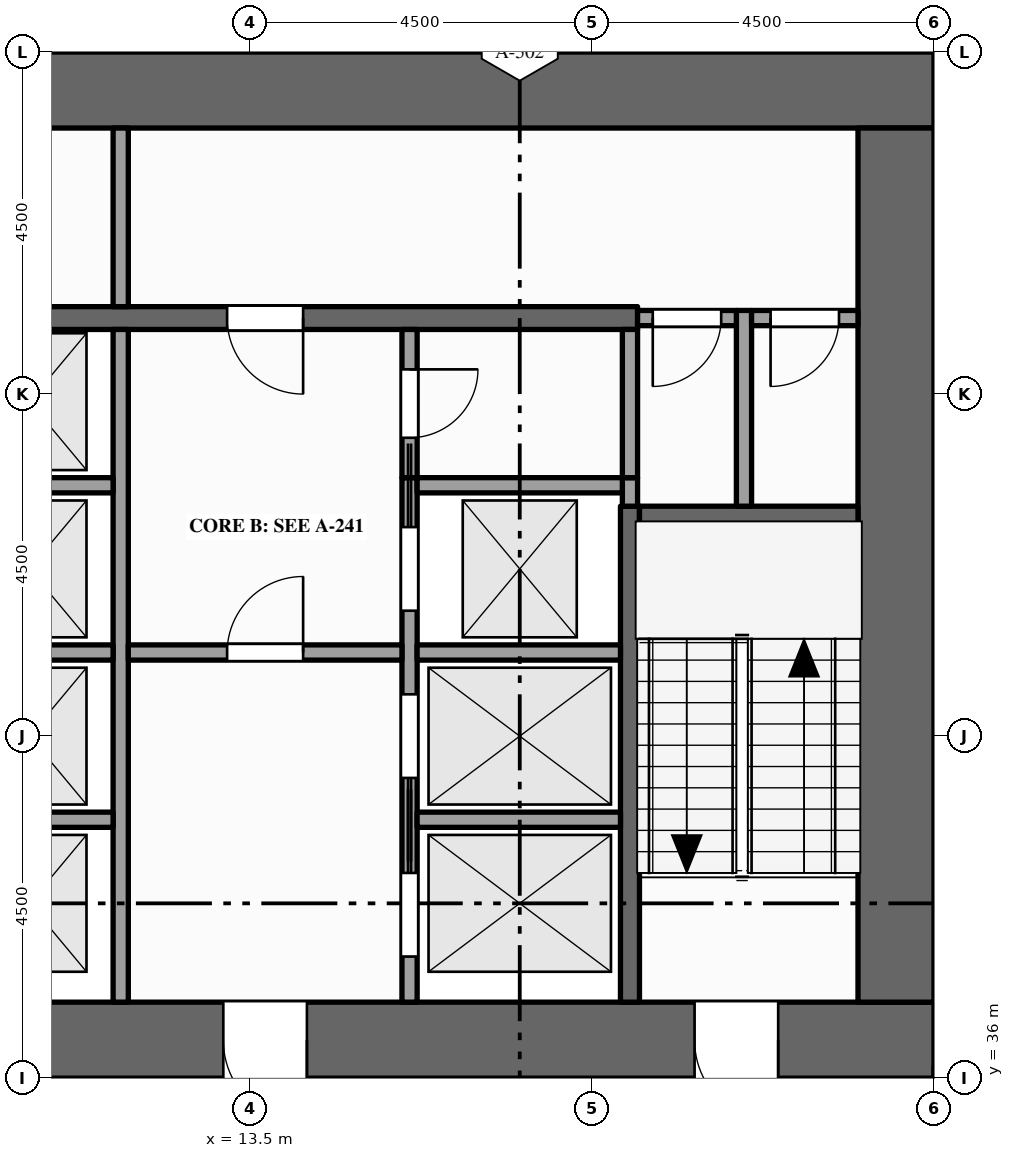
"""IFC4 building model, lengths in metres.
Left out: names, types, materials, properties, quantities, classifications, styles, units other than length and angle.
Written with IfcOpenShell. Run it as: python <this file> out.ifc"""

import sys

from ifc_helpers import new_model, si_unit, direction, frame, frame_2d, origin, place, context, subcontext, project, spatial, rectangle, extrude, element, fill, save


model = new_model("IFC4")
c1 = context("Model", 3, precision=1e-05, world=origin(), true_north=direction((0.0, 1.0)))
c2 = subcontext(c1, "Body", "Model", "MODEL_VIEW")
j1 = project(units=[si_unit("LENGTHUNIT", "METRE"), si_unit("PLANEANGLEUNIT", "RADIAN")], contexts=[c1])
p1 = place(None, origin())
s1 = spatial("IfcSite", under=j1, at=p1, CompositionType="ELEMENT")
p2 = place(p1, origin())
s2 = spatial("IfcBuilding", under=s1, at=p2, CompositionType="ELEMENT")
p3 = place(p2, frame((0.0, 0.0, 227.0)))
s3 = spatial("IfcBuildingStorey", under=s2, at=p3, CompositionType="ELEMENT", Elevation=227.0)
p4 = place(p3, frame((0.0, 36.5, -0.15), z_axis=(0.0, 0.0, 1.0), x_axis=(1.0, 0.0, 0.0)))
e1 = element("IfcWall", 1, at=p4, inside=s3, PredefinedType="SHEAR", context=c2, shape_type="SweptSolid", body=[
    extrude(rectangle(XDim=22.5, YDim=1.0, at=frame_2d((11.25, 0.0))), origin(), (0.0, 0.0, 1.0), 4.0),
])
p5 = place(p4, frame((7.1, 0.0, 0.15)))
e2 = element("IfcOpeningElement", 2, at=p5, cuts=e1, PredefinedType="OPENING", context=c2, shape_type="SweptSolid", body=[
    extrude(rectangle(XDim=1.8, YDim=2.1, at=frame_2d((0.9, 1.05))), frame((0.0, 0.51, 0.0), z_axis=(0.0, -1.0, 0.0), x_axis=(1.0, 0.0, 0.0)), (0.0, 0.0, 1.0), 1.02),
])
p6 = place(p4, frame((13.15, 0.0, 0.15)))
e3 = element("IfcOpeningElement", 3, at=p6, cuts=e1, PredefinedType="OPENING", context=c2, shape_type="SweptSolid", body=[
    extrude(rectangle(XDim=1.1, YDim=2.1, at=frame_2d((0.55, 1.05))), frame((0.0, 0.51, 0.0), z_axis=(0.0, -1.0, 0.0), x_axis=(1.0, 0.0, 0.0)), (0.0, 0.0, 1.0), 1.02),
])
p7 = place(p4, frame((2.15, 0.0, 0.15)))
e4 = element("IfcOpeningElement", 4, at=p7, cuts=e1, PredefinedType="OPENING", context=c2, shape_type="SweptSolid", body=[
    extrude(rectangle(XDim=1.1, YDim=2.1, at=frame_2d((0.55, 1.05))), frame((0.0, 0.51, 0.0), z_axis=(0.0, -1.0, 0.0), x_axis=(1.0, 0.0, 0.0)), (0.0, 0.0, 1.0), 1.02),
])
p8 = place(p4, frame((19.35, 0.0, 0.15)))
e5 = element("IfcOpeningElement", 5, at=p8, cuts=e1, PredefinedType="OPENING", context=c2, shape_type="SweptSolid", body=[
    extrude(rectangle(XDim=1.1, YDim=2.1, at=frame_2d((0.55, 1.05))), frame((0.0, 0.51, 0.0), z_axis=(0.0, -1.0, 0.0), x_axis=(1.0, 0.0, 0.0)), (0.0, 0.0, 1.0), 1.02),
])
p9 = place(p3, frame((0.0, 49.0, -0.15), z_axis=(0.0, 0.0, 1.0), x_axis=(1.0, 0.0, 0.0)))
e6 = element("IfcWall", 6, at=p9, inside=s3, PredefinedType="SHEAR", context=c2, shape_type="SweptSolid", body=[
    extrude(rectangle(XDim=22.5, YDim=1.0, at=frame_2d((11.25, 0.0))), origin(), (0.0, 0.0, 1.0), 4.0),
])
p10 = place(p3, frame((22.0, 37.0, -0.15), z_axis=(0.0, 0.0, 1.0), x_axis=(0.0, 1.0, 0.0)))
e7 = element("IfcWall", 7, at=p10, inside=s3, PredefinedType="SHEAR", context=c2, shape_type="SweptSolid", body=[
    extrude(rectangle(XDim=11.5, YDim=1.0, at=frame_2d((5.75, 0.0))), origin(), (0.0, 0.0, 1.0), 4.0),
])
p11 = place(p3, frame((11.8, 37.0, 0.0), z_axis=(0.0, 0.0, 1.0), x_axis=(0.0, 1.0, 0.0)))
e8 = element("IfcWall", 8, at=p11, inside=s3, PredefinedType="SOLIDWALL", context=c2, shape_type="SweptSolid", body=[
    extrude(rectangle(XDim=8.85, YDim=0.2, at=frame_2d((4.425, 0.0))), origin(), (0.0, 0.0, 1.0), 3.85),
])
p12 = place(p3, frame((11.8, 46.15, 0.0), z_axis=(0.0, 0.0, 1.0), x_axis=(0.0, 1.0, 0.0)))
e9 = element("IfcWall", 9, at=p12, inside=s3, PredefinedType="PARTITIONING", context=c2, shape_type="SweptSolid", body=[
    extrude(rectangle(XDim=2.35, YDim=0.2, at=frame_2d((1.175, 0.0))), origin(), (0.0, 0.0, 1.0), 3.85),
])
p13 = place(p3, frame((15.6, 37.0, 0.0), z_axis=(0.0, 0.0, 1.0), x_axis=(0.0, 1.0, 0.0)))
e10 = element("IfcWall", 10, at=p13, inside=s3, PredefinedType="SOLIDWALL", context=c2, shape_type="SweptSolid", body=[
    extrude(rectangle(XDim=6.9, YDim=0.2, at=frame_2d((3.45, 0.0))), origin(), (0.0, 0.0, 1.0), 3.85),
])
p14 = place(p13, frame((0.6, 0.0, 0.012)))
e11 = element("IfcOpeningElement", 11, at=p14, cuts=e10, PredefinedType="OPENING", context=c2, shape_type="SweptSolid", body=[
    extrude(rectangle(XDim=1.1, YDim=2.1, at=frame_2d((0.55, 1.05))), frame((0.0, 0.11, 0.0), z_axis=(0.0, -1.0, 0.0), x_axis=(1.0, 0.0, 0.0)), (0.0, 0.0, 1.0), 0.22),
])
p15 = place(p13, frame((2.95, 0.0, 0.012)))
e12 = element("IfcOpeningElement", 12, at=p15, cuts=e10, PredefinedType="OPENING", context=c2, shape_type="SweptSolid", body=[
    extrude(rectangle(XDim=1.1, YDim=2.1, at=frame_2d((0.55, 1.05))), frame((0.0, 0.11, 0.0), z_axis=(0.0, -1.0, 0.0), x_axis=(1.0, 0.0, 0.0)), (0.0, 0.0, 1.0), 0.22),
])
p16 = place(p13, frame((5.15, 0.0, 0.012)))
e13 = element("IfcOpeningElement", 13, at=p16, cuts=e10, PredefinedType="OPENING", context=c2, shape_type="SweptSolid", body=[
    extrude(rectangle(XDim=1.1, YDim=2.1, at=frame_2d((0.55, 1.05))), frame((0.0, 0.11, 0.0), z_axis=(0.0, -1.0, 0.0), x_axis=(1.0, 0.0, 0.0)), (0.0, 0.0, 1.0), 0.22),
])
p17 = place(p3, frame((15.6, 43.9, 0.0), z_axis=(0.0, 0.0, 1.0), x_axis=(0.0, 1.0, 0.0)))
e14 = element("IfcWall", 14, at=p17, inside=s3, PredefinedType="PARTITIONING", context=c2, shape_type="SweptSolid", body=[
    extrude(rectangle(XDim=1.95, YDim=0.2, at=frame_2d((0.975, 0.0))), origin(), (0.0, 0.0, 1.0), 3.85),
])
p18 = place(p17, frame((0.525, 0.0, 0.0)))
e15 = element("IfcOpeningElement", 15, at=p18, cuts=e14, PredefinedType="OPENING", context=c2, shape_type="SweptSolid", body=[
    extrude(rectangle(XDim=0.9, YDim=2.1, at=frame_2d((0.45, 1.05))), frame((0.0, 0.11, 0.0), z_axis=(0.0, -1.0, 0.0), x_axis=(1.0, 0.0, 0.0)), (0.0, 0.0, 1.0), 0.22),
])
p19 = place(p3, frame((18.5, 37.0, 0.0), z_axis=(0.0, 0.0, 1.0), x_axis=(0.0, 1.0, 0.0)))
e16 = element("IfcWall", 16, at=p19, inside=s3, PredefinedType="SHEAR", context=c2, shape_type="SweptSolid", body=[
    extrude(rectangle(XDim=6.525, YDim=0.25, at=frame_2d((3.262, 0.0))), origin(), (0.0, 0.0, 1.0), 3.85),
])
p20 = place(p3, frame((18.5, 43.525, 0.0), z_axis=(0.0, 0.0, 1.0), x_axis=(0.0, 1.0, 0.0)))
e17 = element("IfcWall", 17, at=p20, inside=s3, PredefinedType="SOLIDWALL", context=c2, shape_type="SweptSolid", body=[
    extrude(rectangle(XDim=0.375, YDim=0.2, at=frame_2d((0.188, 0.0))), origin(), (0.0, 0.0, 1.0), 3.85),
])
p21 = place(p3, frame((18.5, 43.9, 0.0), z_axis=(0.0, 0.0, 1.0), x_axis=(0.0, 1.0, 0.0)))
e18 = element("IfcWall", 18, at=p21, inside=s3, PredefinedType="PARTITIONING", context=c2, shape_type="SweptSolid", body=[
    extrude(rectangle(XDim=1.95, YDim=0.2, at=frame_2d((0.975, 0.0))), origin(), (0.0, 0.0, 1.0), 3.85),
])
p22 = place(p3, frame((20.0, 43.525, 0.0), z_axis=(0.0, 0.0, 1.0), x_axis=(0.0, 1.0, 0.0)))
e19 = element("IfcWall", 19, at=p22, inside=s3, PredefinedType="PARTITIONING", context=c2, shape_type="SweptSolid", body=[
    extrude(rectangle(XDim=2.575, YDim=0.2, at=frame_2d((1.288, 0.0))), origin(), (0.0, 0.0, 1.0), 3.85),
])
p23 = place(p3, frame((9.5, 39.4, 0.0), z_axis=(0.0, 0.0, 1.0), x_axis=(1.0, 0.0, 0.0)))
e20 = element("IfcWall", 20, at=p23, inside=s3, PredefinedType="SOLIDWALL", context=c2, shape_type="SweptSolid", body=[
    extrude(rectangle(XDim=2.2, YDim=0.2, at=frame_2d((1.1, 0.0))), origin(), (0.0, 0.0, 1.0), 3.85),
])
p24 = place(p3, frame((15.7, 39.4, 0.0), z_axis=(0.0, 0.0, 1.0), x_axis=(1.0, 0.0, 0.0)))
e21 = element("IfcWall", 21, at=p24, inside=s3, PredefinedType="SOLIDWALL", context=c2, shape_type="SweptSolid", body=[
    extrude(rectangle(XDim=2.675, YDim=0.2, at=frame_2d((1.337, 0.0))), origin(), (0.0, 0.0, 1.0), 3.85),
])
p25 = place(p3, frame((9.5, 41.6, 0.0), z_axis=(0.0, 0.0, 1.0), x_axis=(1.0, 0.0, 0.0)))
e22 = element("IfcWall", 22, at=p25, inside=s3, PredefinedType="SOLIDWALL", context=c2, shape_type="SweptSolid", body=[
    extrude(rectangle(XDim=2.2, YDim=0.2, at=frame_2d((1.1, 0.0))), origin(), (0.0, 0.0, 1.0), 3.85),
])
p26 = place(p3, frame((11.9, 41.6, 0.0), z_axis=(0.0, 0.0, 1.0), x_axis=(1.0, 0.0, 0.0)))
e23 = element("IfcWall", 23, at=p26, inside=s3, PredefinedType="PARTITIONING", context=c2, shape_type="SweptSolid", body=[
    extrude(rectangle(XDim=3.6, YDim=0.2, at=frame_2d((1.8, 0.0))), origin(), (0.0, 0.0, 1.0), 3.85),
])
p27 = place(p26, frame((1.3, 0.0, 0.0)))
e24 = element("IfcOpeningElement", 24, at=p27, cuts=e23, PredefinedType="OPENING", context=c2, shape_type="SweptSolid", body=[
    extrude(rectangle(XDim=1.0, YDim=2.1, at=frame_2d((0.5, 1.05))), frame((0.0, 0.11, 0.0), z_axis=(0.0, -1.0, 0.0), x_axis=(1.0, 0.0, 0.0)), (0.0, 0.0, 1.0), 0.22),
])
p28 = place(p3, frame((15.7, 41.6, 0.0), z_axis=(0.0, 0.0, 1.0), x_axis=(1.0, 0.0, 0.0)))
e25 = element("IfcWall", 25, at=p28, inside=s3, PredefinedType="SOLIDWALL", context=c2, shape_type="SweptSolid", body=[
    extrude(rectangle(XDim=2.675, YDim=0.2, at=frame_2d((1.337, 0.0))), origin(), (0.0, 0.0, 1.0), 3.85),
])
p29 = place(p3, frame((18.625, 43.4, 0.0), z_axis=(0.0, 0.0, 1.0), x_axis=(1.0, 0.0, 0.0)))
e26 = element("IfcWall", 26, at=p29, inside=s3, PredefinedType="SHEAR", context=c2, shape_type="SweptSolid", body=[
    extrude(rectangle(XDim=2.875, YDim=0.25, at=frame_2d((1.438, 0.0))), origin(), (0.0, 0.0, 1.0), 3.85),
])
p30 = place(p3, frame((9.5, 43.8, 0.0), z_axis=(0.0, 0.0, 1.0), x_axis=(1.0, 0.0, 0.0)))
e27 = element("IfcWall", 27, at=p30, inside=s3, PredefinedType="SOLIDWALL", context=c2, shape_type="SweptSolid", body=[
    extrude(rectangle(XDim=2.2, YDim=0.2, at=frame_2d((1.1, 0.0))), origin(), (0.0, 0.0, 1.0), 3.85),
])
p31 = place(p3, frame((15.7, 43.8, 0.0), z_axis=(0.0, 0.0, 1.0), x_axis=(1.0, 0.0, 0.0)))
e28 = element("IfcWall", 28, at=p31, inside=s3, PredefinedType="SOLIDWALL", context=c2, shape_type="SweptSolid", body=[
    extrude(rectangle(XDim=2.7, YDim=0.2, at=frame_2d((1.35, 0.0))), origin(), (0.0, 0.0, 1.0), 3.85),
])
p32 = place(p3, frame((4.1, 46.0, 0.0), z_axis=(0.0, 0.0, 1.0), x_axis=(1.0, 0.0, 0.0)))
e29 = element("IfcWall", 29, at=p32, inside=s3, PredefinedType="SHEAR", context=c2, shape_type="SweptSolid", body=[
    extrude(rectangle(XDim=14.5, YDim=0.3, at=frame_2d((7.25, 0.0))), origin(), (0.0, 0.0, 1.0), 3.85),
])
p33 = place(p32, frame((3.4, 0.0, 0.0)))
e30 = element("IfcOpeningElement", 30, at=p33, cuts=e29, PredefinedType="OPENING", context=c2, shape_type="SweptSolid", body=[
    extrude(rectangle(XDim=1.0, YDim=2.1, at=frame_2d((0.5, 1.05))), frame((0.0, 0.16, 0.0), z_axis=(0.0, -1.0, 0.0), x_axis=(1.0, 0.0, 0.0)), (0.0, 0.0, 1.0), 0.32),
])
p34 = place(p32, frame((9.1, 0.0, 0.0)))
e31 = element("IfcOpeningElement", 31, at=p34, cuts=e29, PredefinedType="OPENING", context=c2, shape_type="SweptSolid", body=[
    extrude(rectangle(XDim=1.0, YDim=2.1, at=frame_2d((0.5, 1.05))), frame((0.0, 0.16, 0.0), z_axis=(0.0, -1.0, 0.0), x_axis=(1.0, 0.0, 0.0)), (0.0, 0.0, 1.0), 0.32),
])
p35 = place(p3, frame((18.6, 46.0, 0.0), z_axis=(0.0, 0.0, 1.0), x_axis=(1.0, 0.0, 0.0)))
e32 = element("IfcWall", 32, at=p35, inside=s3, PredefinedType="PARTITIONING", context=c2, shape_type="SweptSolid", body=[
    extrude(rectangle(XDim=1.3, YDim=0.2, at=frame_2d((0.65, 0.0))), origin(), (0.0, 0.0, 1.0), 3.85),
])
p36 = place(p35, frame((0.2, 0.0, 0.0)))
e33 = element("IfcOpeningElement", 33, at=p36, cuts=e32, PredefinedType="OPENING", context=c2, shape_type="SweptSolid", body=[
    extrude(rectangle(XDim=0.9, YDim=2.1, at=frame_2d((0.45, 1.05))), frame((0.0, 0.11, 0.0), z_axis=(0.0, -1.0, 0.0), x_axis=(1.0, 0.0, 0.0)), (0.0, 0.0, 1.0), 0.22),
])
p37 = place(p3, frame((20.1, 46.0, 0.0), z_axis=(0.0, 0.0, 1.0), x_axis=(1.0, 0.0, 0.0)))
e34 = element("IfcWall", 34, at=p37, inside=s3, PredefinedType="PARTITIONING", context=c2, shape_type="SweptSolid", body=[
    extrude(rectangle(XDim=1.4, YDim=0.2, at=frame_2d((0.7, 0.0))), origin(), (0.0, 0.0, 1.0), 3.85),
])
p38 = place(p37, frame((0.25, 0.0, 0.0)))
e35 = element("IfcOpeningElement", 35, at=p38, cuts=e34, PredefinedType="OPENING", context=c2, shape_type="SweptSolid", body=[
    extrude(rectangle(XDim=0.9, YDim=2.1, at=frame_2d((0.45, 1.05))), frame((0.0, 0.11, 0.0), z_axis=(0.0, -1.0, 0.0), x_axis=(1.0, 0.0, 0.0)), (0.0, 0.0, 1.0), 0.22),
])
p39 = place(p14, origin())
e36 = element("IfcDoor", 36, at=p39, inside=s3, OperationType="SLIDING_TO_RIGHT", PredefinedType="DOOR", context=c2, shape_type="SweptSolid", body=[
    extrude(rectangle(XDim=1.1, YDim=2.1, at=frame_2d((0.55, 1.05))), frame((0.0, 0.025, 0.0), z_axis=(0.0, -1.0, 0.0), x_axis=(1.0, 0.0, 0.0)), (0.0, 0.0, 1.0), 0.05),
])
fill(e11, e36)
p40 = place(p15, origin())
e37 = element("IfcDoor", 37, at=p40, inside=s3, OperationType="SLIDING_TO_LEFT", PredefinedType="DOOR", context=c2, shape_type="SweptSolid", body=[
    extrude(rectangle(XDim=1.1, YDim=2.1, at=frame_2d((0.55, 1.05))), frame((0.0, 0.025, 0.0), z_axis=(0.0, -1.0, 0.0), x_axis=(1.0, 0.0, 0.0)), (0.0, 0.0, 1.0), 0.05),
])
fill(e12, e37)
p41 = place(p16, origin())
e38 = element("IfcDoor", 38, at=p41, inside=s3, OperationType="SLIDING_TO_RIGHT", PredefinedType="DOOR", context=c2, shape_type="SweptSolid", body=[
    extrude(rectangle(XDim=1.1, YDim=2.1, at=frame_2d((0.55, 1.05))), frame((0.0, 0.025, 0.0), z_axis=(0.0, -1.0, 0.0), x_axis=(1.0, 0.0, 0.0)), (0.0, 0.0, 1.0), 0.05),
])
fill(e13, e38)
p42 = place(p6, origin())
e39 = element("IfcDoor", 39, at=p42, inside=s3, OperationType="SINGLE_SWING_RIGHT", PredefinedType="DOOR", context=c2, shape_type="SweptSolid", body=[
    extrude(rectangle(XDim=1.1, YDim=2.1, at=frame_2d((0.55, 1.05))), frame((0.0, 0.025, 0.0), z_axis=(0.0, -1.0, 0.0), x_axis=(1.0, 0.0, 0.0)), (0.0, 0.0, 1.0), 0.05),
])
fill(e3, e39)
p43 = place(p27, origin())
e40 = element("IfcDoor", 40, at=p43, inside=s3, OperationType="SINGLE_SWING_RIGHT", PredefinedType="DOOR", context=c2, shape_type="SweptSolid", body=[
    extrude(rectangle(XDim=1.0, YDim=2.1, at=frame_2d((0.5, 1.05))), frame((0.0, 0.025, 0.0), z_axis=(0.0, -1.0, 0.0), x_axis=(1.0, 0.0, 0.0)), (0.0, 0.0, 1.0), 0.05),
])
fill(e24, e40)
p44 = place(p34, origin())
e41 = element("IfcDoor", 41, at=p44, inside=s3, OperationType="SINGLE_SWING_RIGHT", PredefinedType="DOOR", context=c2, shape_type="SweptSolid", body=[
    extrude(rectangle(XDim=1.0, YDim=2.1, at=frame_2d((0.5, 1.05))), frame((0.0, 0.025, 0.0), z_axis=(0.0, -1.0, 0.0), x_axis=(1.0, 0.0, 0.0)), (0.0, 0.0, 1.0), 0.05),
])
fill(e31, e41)
p45 = place(p8, origin())
e42 = element("IfcDoor", 42, at=p45, inside=s3, OperationType="SINGLE_SWING_RIGHT", PredefinedType="DOOR", context=c2, shape_type="SweptSolid", body=[
    extrude(rectangle(XDim=1.1, YDim=2.1, at=frame_2d((0.55, 1.05))), frame((0.0, 0.025, 0.0), z_axis=(0.0, -1.0, 0.0), x_axis=(1.0, 0.0, 0.0)), (0.0, 0.0, 1.0), 0.05),
])
fill(e5, e42)
p46 = place(p36, origin())
e43 = element("IfcDoor", 43, at=p46, inside=s3, OperationType="SINGLE_SWING_LEFT", PredefinedType="DOOR", context=c2, shape_type="SweptSolid", body=[
    extrude(rectangle(XDim=0.9, YDim=2.1, at=frame_2d((0.45, 1.05))), frame((0.0, 0.025, 0.0), z_axis=(0.0, -1.0, 0.0), x_axis=(1.0, 0.0, 0.0)), (0.0, 0.0, 1.0), 0.05),
])
fill(e33, e43)
p47 = place(p38, origin())
e44 = element("IfcDoor", 44, at=p47, inside=s3, OperationType="SINGLE_SWING_LEFT", PredefinedType="DOOR", context=c2, shape_type="SweptSolid", body=[
    extrude(rectangle(XDim=0.9, YDim=2.1, at=frame_2d((0.45, 1.05))), frame((0.0, 0.025, 0.0), z_axis=(0.0, -1.0, 0.0), x_axis=(1.0, 0.0, 0.0)), (0.0, 0.0, 1.0), 0.05),
])
fill(e35, e44)
p48 = place(p18, origin())
e45 = element("IfcDoor", 45, at=p48, inside=s3, OperationType="SINGLE_SWING_RIGHT", PredefinedType="DOOR", context=c2, shape_type="SweptSolid", body=[
    extrude(rectangle(XDim=0.9, YDim=2.1, at=frame_2d((0.45, 1.05))), frame((0.0, 0.025, 0.0), z_axis=(0.0, -1.0, 0.0), x_axis=(1.0, 0.0, 0.0)), (0.0, 0.0, 1.0), 0.05),
])
fill(e15, e45)
save(model, sys.argv[1])
